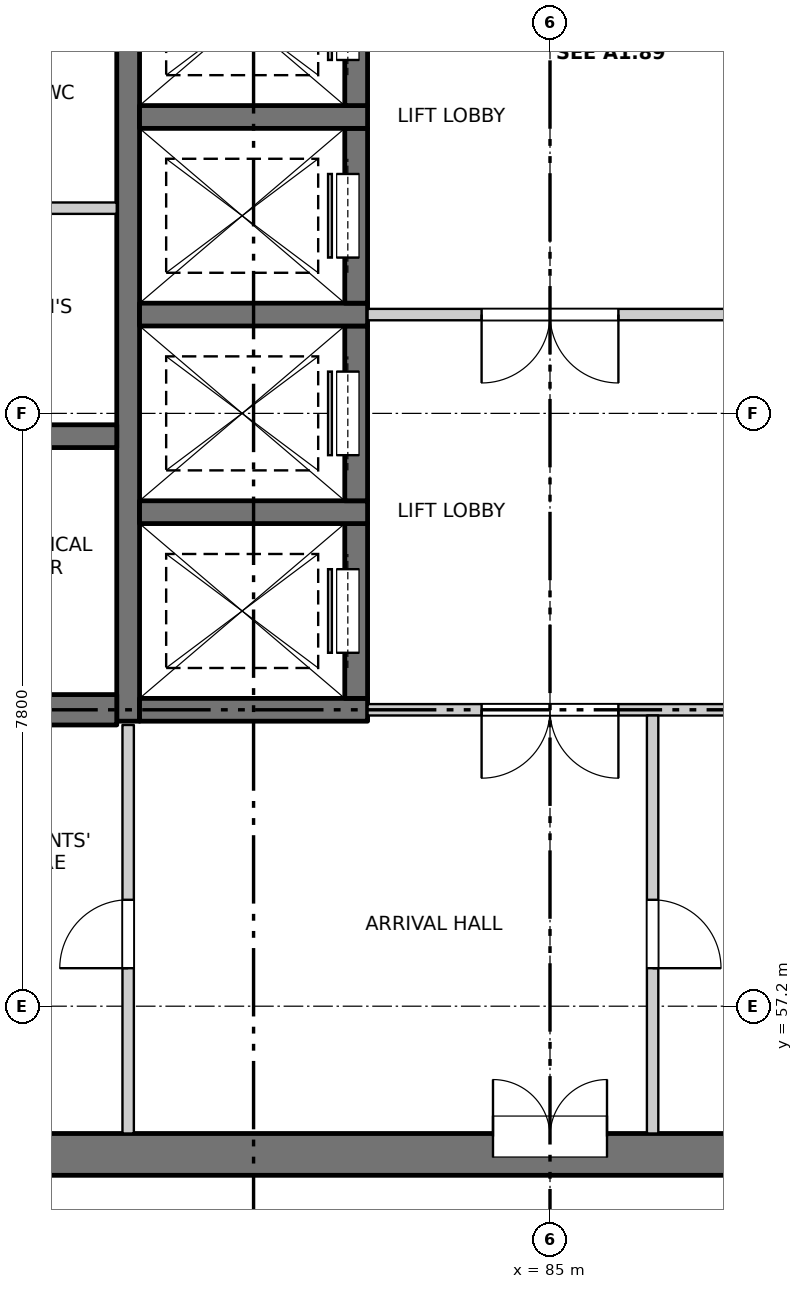
"""IFC4 building model, lengths in metres.
Left out: names, types, materials, properties, quantities, classifications, styles, units other than length and angle.
Written with IfcOpenShell. Run it as: python <this file> out.ifc"""

import sys

from ifc_helpers import new_model, si_unit, direction, frame, frame_2d, origin, place, context, subcontext, project, spatial, rectangle, extrude, element, fill, save


model = new_model("IFC4")
c1 = context("Model", 3, precision=1e-05, world=origin(), true_north=direction((0.0, 1.0)))
c2 = subcontext(c1, "Body", "Model", "MODEL_VIEW")
j1 = project(units=[si_unit("LENGTHUNIT", "METRE"), si_unit("PLANEANGLEUNIT", "RADIAN")], contexts=[c1])
p1 = place(None, origin())
s1 = spatial("IfcSite", under=j1, at=p1, CompositionType="ELEMENT")
p2 = place(p1, origin())
s2 = spatial("IfcBuilding", under=s1, at=p2, CompositionType="ELEMENT")
p3 = place(p2, frame((0.0, 0.0, 133.9)))
s3 = spatial("IfcBuildingStorey", under=s2, at=p3, CompositionType="ELEMENT", Elevation=133.9)
p4 = place(p3, frame((75.525, 55.25, -0.25), z_axis=(0.0, 0.0, 1.0), x_axis=(1.0, 0.0, 0.0)))
e1 = element("IfcWall", 1, at=p4, inside=s3, PredefinedType="SOLIDWALL", context=c2, shape_type="SweptSolid", body=[
    extrude(rectangle(XDim=18.95, YDim=0.55, at=frame_2d((9.475, 0.0))), origin(), (0.0, 0.0, 1.0), 3.4),
])
p5 = place(p4, frame((8.725, 0.0, 0.25)))
e2 = element("IfcOpeningElement", 2, at=p5, cuts=e1, PredefinedType="OPENING", context=c2, shape_type="SweptSolid", body=[
    extrude(rectangle(XDim=1.5, YDim=2.1, at=frame_2d((0.75, 1.05))), frame((0.0, 0.285, 0.0), z_axis=(0.0, -1.0, 0.0), x_axis=(1.0, 0.0, 0.0)), (0.0, 0.0, 1.0), 0.57),
])
p6 = place(p3, frame((79.45, 60.95, -0.25), z_axis=(0.0, 0.0, 1.0), x_axis=(0.0, 1.0, 0.0)))
e3 = element("IfcWall", 3, at=p6, inside=s3, PredefinedType="SOLIDWALL", context=c2, shape_type="SweptSolid", body=[
    extrude(rectangle(XDim=16.35, YDim=0.3, at=frame_2d((8.175, 0.0))), origin(), (0.0, 0.0, 1.0), 3.4),
])
p7 = place(p3, frame((79.6, 61.1, -0.25), z_axis=(0.0, 0.0, 1.0), x_axis=(1.0, 0.0, 0.0)))
e4 = element("IfcWall", 4, at=p7, inside=s3, PredefinedType="SOLIDWALL", context=c2, shape_type="SweptSolid", body=[
    extrude(rectangle(XDim=3.0, YDim=0.3, at=frame_2d((1.5, 0.0))), origin(), (0.0, 0.0, 1.0), 3.4),
])
p8 = place(p3, frame((82.45, 61.25, -0.25), z_axis=(0.0, 0.0, 1.0), x_axis=(0.0, 1.0, 0.0)))
e5 = element("IfcWall", 5, at=p8, inside=s3, PredefinedType="SOLIDWALL", context=c2, shape_type="SweptSolid", body=[
    extrude(rectangle(XDim=2.3, YDim=0.3, at=frame_2d((1.15, 0.0))), origin(), (0.0, 0.0, 1.0), 3.4),
])
p9 = place(p8, frame((0.6, 0.0, 0.25)))
e6 = element("IfcOpeningElement", 6, at=p9, cuts=e5, PredefinedType="OPENING", context=c2, shape_type="SweptSolid", body=[
    extrude(rectangle(XDim=1.1, YDim=2.1, at=frame_2d((0.55, 1.05))), frame((0.0, 0.16, 0.0), z_axis=(0.0, -1.0, 0.0), x_axis=(1.0, 0.0, 0.0)), (0.0, 0.0, 1.0), 0.32),
])
p10 = place(p3, frame((79.6, 63.7, -0.25), z_axis=(0.0, 0.0, 1.0), x_axis=(1.0, 0.0, 0.0)))
e7 = element("IfcWall", 7, at=p10, inside=s3, PredefinedType="SOLIDWALL", context=c2, shape_type="SweptSolid", body=[
    extrude(rectangle(XDim=3.0, YDim=0.3, at=frame_2d((1.5, 0.0))), origin(), (0.0, 0.0, 1.0), 3.4),
])
p11 = place(p3, frame((82.45, 63.85, -0.25), z_axis=(0.0, 0.0, 1.0), x_axis=(0.0, 1.0, 0.0)))
e8 = element("IfcWall", 8, at=p11, inside=s3, PredefinedType="SOLIDWALL", context=c2, shape_type="SweptSolid", body=[
    extrude(rectangle(XDim=2.3, YDim=0.3, at=frame_2d((1.15, 0.0))), origin(), (0.0, 0.0, 1.0), 3.4),
])
p12 = place(p11, frame((0.6, 0.0, 0.25)))
e9 = element("IfcOpeningElement", 9, at=p12, cuts=e8, PredefinedType="OPENING", context=c2, shape_type="SweptSolid", body=[
    extrude(rectangle(XDim=1.1, YDim=2.1, at=frame_2d((0.55, 1.05))), frame((0.0, 0.16, 0.0), z_axis=(0.0, -1.0, 0.0), x_axis=(1.0, 0.0, 0.0)), (0.0, 0.0, 1.0), 0.32),
])
p13 = place(p3, frame((79.6, 66.3, -0.25), z_axis=(0.0, 0.0, 1.0), x_axis=(1.0, 0.0, 0.0)))
e10 = element("IfcWall", 10, at=p13, inside=s3, PredefinedType="SOLIDWALL", context=c2, shape_type="SweptSolid", body=[
    extrude(rectangle(XDim=3.0, YDim=0.3, at=frame_2d((1.5, 0.0))), origin(), (0.0, 0.0, 1.0), 3.4),
])
p14 = place(p3, frame((82.45, 66.45, -0.25), z_axis=(0.0, 0.0, 1.0), x_axis=(0.0, 1.0, 0.0)))
e11 = element("IfcWall", 11, at=p14, inside=s3, PredefinedType="SOLIDWALL", context=c2, shape_type="SweptSolid", body=[
    extrude(rectangle(XDim=2.3, YDim=0.3, at=frame_2d((1.15, 0.0))), origin(), (0.0, 0.0, 1.0), 3.4),
])
p15 = place(p14, frame((0.6, 0.0, 0.25)))
e12 = element("IfcOpeningElement", 12, at=p15, cuts=e11, PredefinedType="OPENING", context=c2, shape_type="SweptSolid", body=[
    extrude(rectangle(XDim=1.1, YDim=2.1, at=frame_2d((0.55, 1.05))), frame((0.0, 0.16, 0.0), z_axis=(0.0, -1.0, 0.0), x_axis=(1.0, 0.0, 0.0)), (0.0, 0.0, 1.0), 0.32),
])
p16 = place(p3, frame((79.6, 68.9, -0.25), z_axis=(0.0, 0.0, 1.0), x_axis=(1.0, 0.0, 0.0)))
e13 = element("IfcWall", 13, at=p16, inside=s3, PredefinedType="SOLIDWALL", context=c2, shape_type="SweptSolid", body=[
    extrude(rectangle(XDim=3.0, YDim=0.3, at=frame_2d((1.5, 0.0))), origin(), (0.0, 0.0, 1.0), 3.4),
])
p17 = place(p3, frame((82.45, 69.05, -0.25), z_axis=(0.0, 0.0, 1.0), x_axis=(0.0, 1.0, 0.0)))
e14 = element("IfcWall", 14, at=p17, inside=s3, PredefinedType="SOLIDWALL", context=c2, shape_type="SweptSolid", body=[
    extrude(rectangle(XDim=2.3, YDim=0.3, at=frame_2d((1.15, 0.0))), origin(), (0.0, 0.0, 1.0), 3.4),
])
p18 = place(p17, frame((0.6, 0.0, 0.25)))
e15 = element("IfcOpeningElement", 15, at=p18, cuts=e14, PredefinedType="OPENING", context=c2, shape_type="SweptSolid", body=[
    extrude(rectangle(XDim=1.1, YDim=2.1, at=frame_2d((0.55, 1.05))), frame((0.0, 0.16, 0.0), z_axis=(0.0, -1.0, 0.0), x_axis=(1.0, 0.0, 0.0)), (0.0, 0.0, 1.0), 0.32),
])
p19 = place(p3, frame((75.525, 61.1, -0.25), z_axis=(0.0, 0.0, 1.0), x_axis=(1.0, 0.0, 0.0)))
e16 = element("IfcWall", 16, at=p19, inside=s3, PredefinedType="SOLIDWALL", context=c2, shape_type="SweptSolid", body=[
    extrude(rectangle(XDim=3.775, YDim=0.4, at=frame_2d((1.888, 0.0))), origin(), (0.0, 0.0, 1.0), 3.4),
])
p20 = place(p3, frame((75.525, 64.7, -0.25), z_axis=(0.0, 0.0, 1.0), x_axis=(1.0, 0.0, 0.0)))
e17 = element("IfcWall", 17, at=p20, inside=s3, PredefinedType="SOLIDWALL", context=c2, shape_type="SweptSolid", body=[
    extrude(rectangle(XDim=3.775, YDim=0.3, at=frame_2d((1.888, 0.0))), origin(), (0.0, 0.0, 1.0), 3.4),
])
p21 = place(p3, frame((82.6, 61.1, 0.0), z_axis=(0.0, 0.0, 1.0), x_axis=(1.0, 0.0, 0.0)))
e18 = element("IfcWall", 18, at=p21, inside=s3, PredefinedType="PARTITIONING", context=c2, shape_type="SweptSolid", body=[
    extrude(rectangle(XDim=4.8, YDim=0.15, at=frame_2d((2.4, 0.0))), origin(), (0.0, 0.0, 1.0), 3.15),
])
p22 = place(p21, frame((1.5, 0.0, 0.0)))
e19 = element("IfcOpeningElement", 19, at=p22, cuts=e18, PredefinedType="OPENING", context=c2, shape_type="SweptSolid", body=[
    extrude(rectangle(XDim=1.8, YDim=2.1, at=frame_2d((0.9, 1.05))), frame((0.0, 0.085, 0.0), z_axis=(0.0, -1.0, 0.0), x_axis=(1.0, 0.0, 0.0)), (0.0, 0.0, 1.0), 0.17),
])
p23 = place(p3, frame((82.6, 66.3, 0.0), z_axis=(0.0, 0.0, 1.0), x_axis=(1.0, 0.0, 0.0)))
e20 = element("IfcWall", 20, at=p23, inside=s3, PredefinedType="PARTITIONING", context=c2, shape_type="SweptSolid", body=[
    extrude(rectangle(XDim=4.8, YDim=0.15, at=frame_2d((2.4, 0.0))), origin(), (0.0, 0.0, 1.0), 3.15),
])
p24 = place(p23, frame((1.5, 0.0, 0.0)))
e21 = element("IfcOpeningElement", 21, at=p24, cuts=e20, PredefinedType="OPENING", context=c2, shape_type="SweptSolid", body=[
    extrude(rectangle(XDim=1.8, YDim=2.1, at=frame_2d((0.9, 1.05))), frame((0.0, 0.085, 0.0), z_axis=(0.0, -1.0, 0.0), x_axis=(1.0, 0.0, 0.0)), (0.0, 0.0, 1.0), 0.17),
])
p25 = place(p3, frame((75.525, 67.7, 0.0), z_axis=(0.0, 0.0, 1.0), x_axis=(1.0, 0.0, 0.0)))
e22 = element("IfcWall", 22, at=p25, inside=s3, PredefinedType="PARTITIONING", context=c2, shape_type="SweptSolid", body=[
    extrude(rectangle(XDim=3.775, YDim=0.15, at=frame_2d((1.887, 0.0))), origin(), (0.0, 0.0, 1.0), 3.15),
])
p26 = place(p3, frame((79.45, 55.525, 0.0), z_axis=(0.0, 0.0, 1.0), x_axis=(0.0, 1.0, 0.0)))
e23 = element("IfcWall", 23, at=p26, inside=s3, PredefinedType="PARTITIONING", context=c2, shape_type="SweptSolid", body=[
    extrude(rectangle(XDim=5.375, YDim=0.15, at=frame_2d((2.688, 0.0))), origin(), (0.0, 0.0, 1.0), 3.15),
])
p27 = place(p26, frame((2.175, 0.0, 0.0)))
e24 = element("IfcOpeningElement", 24, at=p27, cuts=e23, PredefinedType="OPENING", context=c2, shape_type="SweptSolid", body=[
    extrude(rectangle(XDim=0.9, YDim=2.1, at=frame_2d((0.45, 1.05))), frame((0.0, 0.085, 0.0), z_axis=(0.0, -1.0, 0.0), x_axis=(1.0, 0.0, 0.0)), (0.0, 0.0, 1.0), 0.17),
])
p28 = place(p3, frame((86.35, 55.525, 0.0), z_axis=(0.0, 0.0, 1.0), x_axis=(0.0, 1.0, 0.0)))
e25 = element("IfcWall", 25, at=p28, inside=s3, PredefinedType="PARTITIONING", context=c2, shape_type="SweptSolid", body=[
    extrude(rectangle(XDim=5.5, YDim=0.15, at=frame_2d((2.75, 0.0))), origin(), (0.0, 0.0, 1.0), 3.15),
])
p29 = place(p28, frame((2.175, 0.0, 0.0)))
e26 = element("IfcOpeningElement", 26, at=p29, cuts=e25, PredefinedType="OPENING", context=c2, shape_type="SweptSolid", body=[
    extrude(rectangle(XDim=0.9, YDim=2.1, at=frame_2d((0.45, 1.05))), frame((0.0, 0.085, 0.0), z_axis=(0.0, -1.0, 0.0), x_axis=(1.0, 0.0, 0.0)), (0.0, 0.0, 1.0), 0.17),
])
p30 = place(p5, origin())
e27 = element("IfcDoor", 27, at=p30, inside=s3, OperationType="DOUBLE_DOOR_SINGLE_SWING", PredefinedType="DOOR", context=c2, shape_type="SweptSolid", body=[
    extrude(rectangle(XDim=1.5, YDim=2.1, at=frame_2d((0.75, 1.05))), frame((0.0, 0.26, 0.0), z_axis=(0.0, -1.0, 0.0), x_axis=(1.0, 0.0, 0.0)), (0.0, 0.0, 1.0), 0.05),
])
fill(e2, e27)
p31 = place(p27, origin())
e28 = element("IfcDoor", 28, at=p31, inside=s3, OperationType="SINGLE_SWING_LEFT", PredefinedType="DOOR", context=c2, shape_type="SweptSolid", body=[
    extrude(rectangle(XDim=0.9, YDim=2.1, at=frame_2d((0.45, 1.05))), frame((0.0, 0.025, 0.0), z_axis=(0.0, -1.0, 0.0), x_axis=(1.0, 0.0, 0.0)), (0.0, 0.0, 1.0), 0.05),
])
fill(e24, e28)
p32 = place(p29, origin())
e29 = element("IfcDoor", 29, at=p32, inside=s3, OperationType="SINGLE_SWING_RIGHT", PredefinedType="DOOR", context=c2, shape_type="SweptSolid", body=[
    extrude(rectangle(XDim=0.9, YDim=2.1, at=frame_2d((0.45, 1.05))), frame((0.0, 0.025, 0.0), z_axis=(0.0, -1.0, 0.0), x_axis=(1.0, 0.0, 0.0)), (0.0, 0.0, 1.0), 0.05),
])
fill(e26, e29)
p33 = place(p22, origin())
e30 = element("IfcDoor", 30, at=p33, inside=s3, OperationType="DOUBLE_DOOR_SINGLE_SWING", PredefinedType="DOOR", context=c2, shape_type="SweptSolid", body=[
    extrude(rectangle(XDim=1.8, YDim=2.1, at=frame_2d((0.9, 1.05))), frame((0.0, 0.025, 0.0), z_axis=(0.0, -1.0, 0.0), x_axis=(1.0, 0.0, 0.0)), (0.0, 0.0, 1.0), 0.05),
])
fill(e19, e30)
p34 = place(p9, origin())
e31 = element("IfcDoor", 31, at=p34, inside=s3, OperationType="SLIDING_TO_RIGHT", PredefinedType="DOOR", context=c2, shape_type="SweptSolid", body=[
    extrude(rectangle(XDim=1.1, YDim=2.1, at=frame_2d((0.55, 1.05))), frame((0.0, 0.135, 0.0), z_axis=(0.0, -1.0, 0.0), x_axis=(1.0, 0.0, 0.0)), (0.0, 0.0, 1.0), 0.05),
])
fill(e6, e31)
p35 = place(p12, origin())
e32 = element("IfcDoor", 32, at=p35, inside=s3, OperationType="SLIDING_TO_RIGHT", PredefinedType="DOOR", context=c2, shape_type="SweptSolid", body=[
    extrude(rectangle(XDim=1.1, YDim=2.1, at=frame_2d((0.55, 1.05))), frame((0.0, 0.135, 0.0), z_axis=(0.0, -1.0, 0.0), x_axis=(1.0, 0.0, 0.0)), (0.0, 0.0, 1.0), 0.05),
])
fill(e9, e32)
p36 = place(p24, origin())
e33 = element("IfcDoor", 33, at=p36, inside=s3, OperationType="DOUBLE_DOOR_SINGLE_SWING", PredefinedType="DOOR", context=c2, shape_type="SweptSolid", body=[
    extrude(rectangle(XDim=1.8, YDim=2.1, at=frame_2d((0.9, 1.05))), frame((0.0, 0.025, 0.0), z_axis=(0.0, -1.0, 0.0), x_axis=(1.0, 0.0, 0.0)), (0.0, 0.0, 1.0), 0.05),
])
fill(e21, e33)
p37 = place(p15, origin())
e34 = element("IfcDoor", 34, at=p37, inside=s3, OperationType="SLIDING_TO_RIGHT", PredefinedType="DOOR", context=c2, shape_type="SweptSolid", body=[
    extrude(rectangle(XDim=1.1, YDim=2.1, at=frame_2d((0.55, 1.05))), frame((0.0, 0.135, 0.0), z_axis=(0.0, -1.0, 0.0), x_axis=(1.0, 0.0, 0.0)), (0.0, 0.0, 1.0), 0.05),
])
fill(e12, e34)
p38 = place(p18, origin())
e35 = element("IfcDoor", 35, at=p38, inside=s3, OperationType="SLIDING_TO_LEFT", PredefinedType="DOOR", context=c2, shape_type="SweptSolid", body=[
    extrude(rectangle(XDim=1.1, YDim=2.1, at=frame_2d((0.55, 1.05))), frame((0.0, 0.135, 0.0), z_axis=(0.0, -1.0, 0.0), x_axis=(1.0, 0.0, 0.0)), (0.0, 0.0, 1.0), 0.05),
])
fill(e15, e35)
save(model, sys.argv[1])
